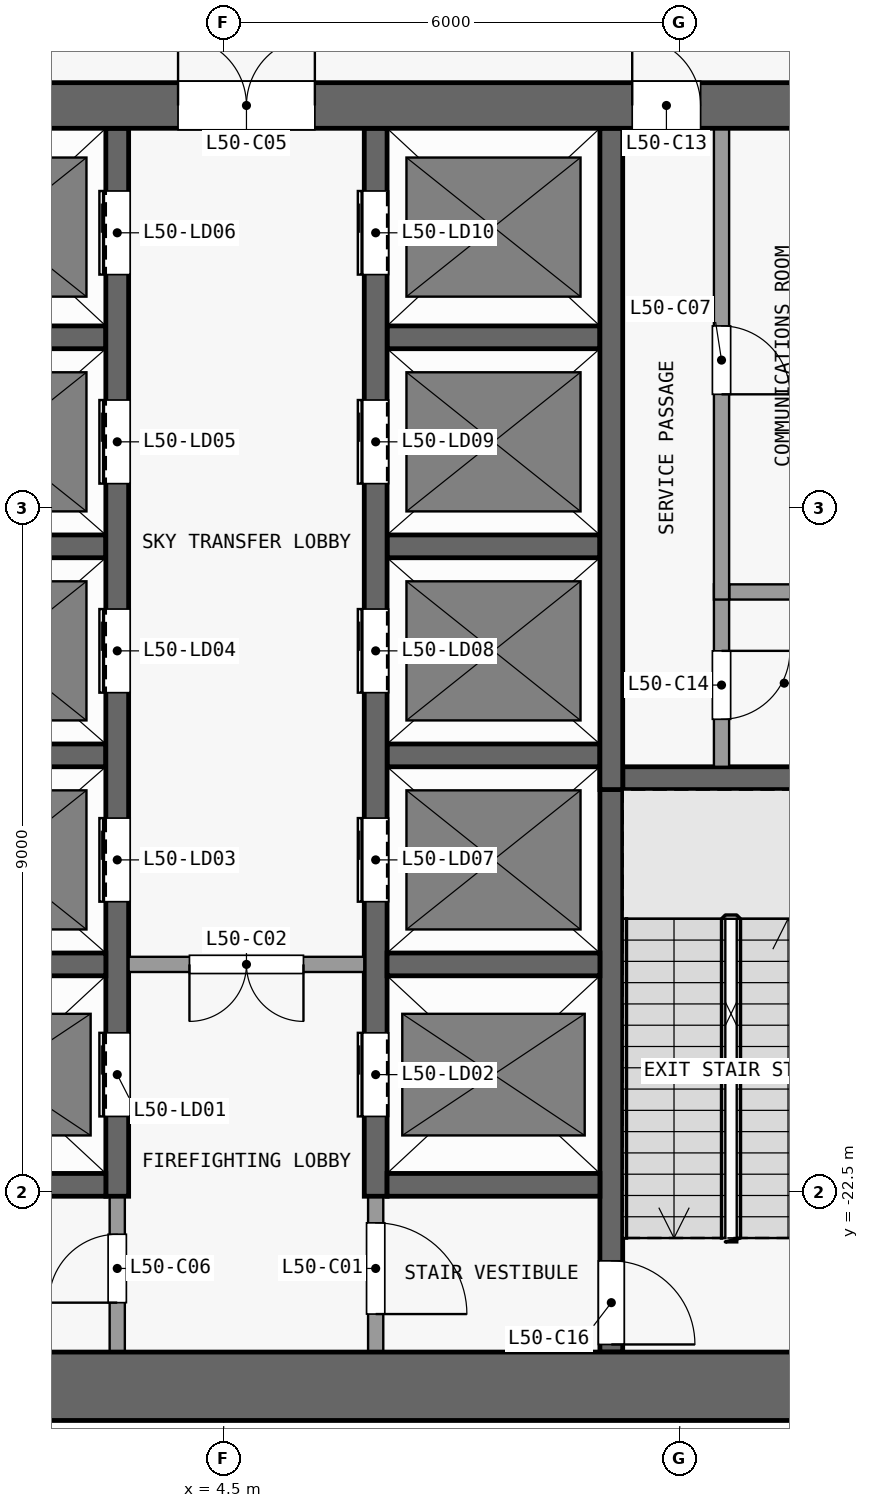
"""IFC4 building model, lengths in metres.
Left out: names, types, materials, properties, quantities, classifications, styles, units other than length and angle.
Written with IfcOpenShell. Run it as: python <this file> out.ifc"""

import sys

from ifc_helpers import new_model, si_unit, direction, frame, frame_2d, origin, place, context, subcontext, project, spatial, rectangle, extrude, element, fill, save


model = new_model("IFC4")
c1 = context("Model", 3, precision=1e-05, world=origin(), true_north=direction((0.0, 1.0)))
c2 = subcontext(c1, "Body", "Model", "MODEL_VIEW")
j1 = project(units=[si_unit("LENGTHUNIT", "METRE"), si_unit("PLANEANGLEUNIT", "RADIAN")], contexts=[c1])
p1 = place(None, origin())
s1 = spatial("IfcSite", under=j1, at=p1, CompositionType="ELEMENT")
p2 = place(p1, origin())
s2 = spatial("IfcBuilding", under=s1, at=p2, CompositionType="ELEMENT")
p3 = place(p2, frame((0.0, 0.0, 199.7)))
s3 = spatial("IfcBuildingStorey", under=s2, at=p3, CompositionType="ELEMENT", Elevation=199.7)
p4 = place(p3, frame((-13.5, -25.05, 0.0), z_axis=(0.0, 0.0, 1.0), x_axis=(1.0, 0.0, 0.0)))
e1 = element("IfcWall", 1, at=p4, inside=s3, PredefinedType="SHEAR", context=c2, shape_type="SweptSolid", body=[
    extrude(rectangle(XDim=27.0, YDim=0.9, at=frame_2d((13.5, 0.0))), origin(), (0.0, 0.0, 1.0), 5.0),
])
p5 = place(p3, frame((-13.5, -8.2, 0.0), z_axis=(0.0, 0.0, 1.0), x_axis=(1.0, 0.0, 0.0)))
e2 = element("IfcWall", 2, at=p5, inside=s3, PredefinedType="SHEAR", context=c2, shape_type="SweptSolid", body=[
    extrude(rectangle(XDim=27.0, YDim=0.6, at=frame_2d((13.5, 0.0))), origin(), (0.0, 0.0, 1.0), 5.0),
])
p6 = place(p5, frame((7.8, 0.0, 0.0)))
e3 = element("IfcOpeningElement", 3, at=p6, cuts=e2, PredefinedType="OPENING", context=c2, shape_type="SweptSolid", body=[
    extrude(rectangle(XDim=1.8, YDim=2.1, at=frame_2d((0.9, 1.05))), frame((0.0, 0.31, 0.0), z_axis=(0.0, -1.0, 0.0), x_axis=(1.0, 0.0, 0.0)), (0.0, 0.0, 1.0), 0.62),
])
p7 = place(p5, frame((17.4, 0.0, 0.0)))
e4 = element("IfcOpeningElement", 4, at=p7, cuts=e2, PredefinedType="OPENING", context=c2, shape_type="SweptSolid", body=[
    extrude(rectangle(XDim=1.8, YDim=2.1, at=frame_2d((0.9, 1.05))), frame((0.0, 0.31, 0.0), z_axis=(0.0, -1.0, 0.0), x_axis=(1.0, 0.0, 0.0)), (0.0, 0.0, 1.0), 0.62),
])
p8 = place(p5, frame((1.725, 0.0, 0.0)))
e5 = element("IfcOpeningElement", 5, at=p8, cuts=e2, PredefinedType="OPENING", context=c2, shape_type="SweptSolid", body=[
    extrude(rectangle(XDim=1.2, YDim=2.1, at=frame_2d((0.6, 1.05))), frame((0.0, 0.31, 0.0), z_axis=(0.0, -1.0, 0.0), x_axis=(1.0, 0.0, 0.0)), (0.0, 0.0, 1.0), 0.62),
])
p9 = place(p5, frame((23.375, 0.0, 0.0)))
e6 = element("IfcOpeningElement", 6, at=p9, cuts=e2, PredefinedType="OPENING", context=c2, shape_type="SweptSolid", body=[
    extrude(rectangle(XDim=0.9, YDim=2.1, at=frame_2d((0.45, 1.05))), frame((0.0, 0.31, 0.0), z_axis=(0.0, -1.0, 0.0), x_axis=(1.0, 0.0, 0.0)), (0.0, 0.0, 1.0), 0.62),
])
p10 = place(p3, frame((-3.25, -22.4, 0.0), z_axis=(0.0, 0.0, 1.0), x_axis=(1.0, 0.0, 0.0)))
e7 = element("IfcWall", 7, at=p10, inside=s3, PredefinedType="SHEAR", context=c2, shape_type="SweptSolid", body=[
    extrude(rectangle(XDim=6.2, YDim=0.3, at=frame_2d((3.1, 0.0))), origin(), (0.0, 0.0, 1.0), 5.0),
])
for number, where, z_axis, x_axis in (
    (8, (6.65, -22.4, 0.0), (0.0, 0.0, 1.0), (1.0, 0.0, 0.0)),
    (9, (0.15, -19.5, 0.0), (0.0, 0.0, 1.0), (1.0, 0.0, 0.0)),
):
    element("IfcWall", number, at=place(p3, frame(where, z_axis=z_axis, x_axis=x_axis)), inside=s3, PredefinedType="SHEAR", context=c2, shape_type="SweptSolid", body=[
        extrude(rectangle(XDim=2.8, YDim=0.3, at=frame_2d((1.4, 0.0))), origin(), (0.0, 0.0, 1.0), 5.0),
    ])
p11 = place(p3, frame((6.35, -19.5, 0.0), z_axis=(0.0, 0.0, 1.0), x_axis=(-1.0, 0.0, 0.0)))
e10 = element("IfcWall", 10, at=p11, inside=s3, PredefinedType="PARTITIONING", context=c2, shape_type="SweptSolid", body=[
    extrude(rectangle(XDim=3.1, YDim=0.2, at=frame_2d((1.55, 0.0))), origin(), (0.0, 0.0, 1.0), 5.0),
])
p12 = place(p11, frame((0.8, 0.0, 0.0)))
e11 = element("IfcOpeningElement", 11, at=p12, cuts=e10, PredefinedType="OPENING", context=c2, shape_type="SweptSolid", body=[
    extrude(rectangle(XDim=1.5, YDim=2.1, at=frame_2d((0.75, 1.05))), frame((0.0, 0.11, 0.0), z_axis=(0.0, -1.0, 0.0), x_axis=(1.0, 0.0, 0.0)), (0.0, 0.0, 1.0), 0.22),
])
p13 = place(p3, frame((6.65, -19.5, 0.0), z_axis=(0.0, 0.0, 1.0), x_axis=(1.0, 0.0, 0.0)))
e12 = element("IfcWall", 12, at=p13, inside=s3, PredefinedType="SHEAR", context=c2, shape_type="SweptSolid", body=[
    extrude(rectangle(XDim=2.8, YDim=0.3, at=frame_2d((1.4, 0.0))), origin(), (0.0, 0.0, 1.0), 5.0),
])
p14 = place(p3, frame((9.75, -17.05, 0.0), z_axis=(0.0, 0.0, 1.0), x_axis=(1.0, 0.0, 0.0)))
e13 = element("IfcWall", 13, at=p14, inside=s3, PredefinedType="SHEAR", context=c2, shape_type="SweptSolid", body=[
    extrude(rectangle(XDim=2.85, YDim=0.3, at=frame_2d((1.425, 0.0))), origin(), (0.0, 0.0, 1.0), 5.0),
])
for number, where, z_axis, x_axis in (
    (14, (0.15, -16.75, 0.0), (0.0, 0.0, 1.0), (1.0, 0.0, 0.0)),
    (15, (6.65, -16.75, 0.0), (0.0, 0.0, 1.0), (1.0, 0.0, 0.0)),
):
    element("IfcWall", number, at=place(p3, frame(where, z_axis=z_axis, x_axis=x_axis)), inside=s3, PredefinedType="SHEAR", context=c2, shape_type="SweptSolid", body=[
        extrude(rectangle(XDim=2.8, YDim=0.3, at=frame_2d((1.4, 0.0))), origin(), (0.0, 0.0, 1.0), 5.0),
    ])
p15 = place(p3, frame((11.15, -14.6, 0.0), z_axis=(0.0, 0.0, 1.0), x_axis=(1.0, 0.0, 0.0)))
e16 = element("IfcWall", 16, at=p15, inside=s3, PredefinedType="PARTITIONING", context=c2, shape_type="SweptSolid", body=[
    extrude(rectangle(XDim=1.45, YDim=0.2, at=frame_2d((0.725, 0.0))), origin(), (0.0, 0.0, 1.0), 5.0),
])
for number, where, z_axis, x_axis in (
    (17, (0.15, -14.0, 0.0), (0.0, 0.0, 1.0), (1.0, 0.0, 0.0)),
    (18, (6.65, -14.0, 0.0), (0.0, 0.0, 1.0), (1.0, 0.0, 0.0)),
    (19, (0.15, -11.25, 0.0), (0.0, 0.0, 1.0), (1.0, 0.0, 0.0)),
    (20, (6.65, -11.25, 0.0), (0.0, 0.0, 1.0), (1.0, 0.0, 0.0)),
):
    element("IfcWall", number, at=place(p3, frame(where, z_axis=z_axis, x_axis=x_axis)), inside=s3, PredefinedType="SHEAR", context=c2, shape_type="SweptSolid", body=[
        extrude(rectangle(XDim=2.8, YDim=0.3, at=frame_2d((1.4, 0.0))), origin(), (0.0, 0.0, 1.0), 5.0),
    ])
p16 = place(p3, frame((3.1, -24.6, 0.0), z_axis=(0.0, 0.0, 1.0), x_axis=(0.0, 1.0, 0.0)))
e21 = element("IfcWall", 21, at=p16, inside=s3, PredefinedType="PARTITIONING", context=c2, shape_type="SweptSolid", body=[
    extrude(rectangle(XDim=2.05, YDim=0.2, at=frame_2d((1.025, 0.0))), origin(), (0.0, 0.0, 1.0), 5.0),
])
p17 = place(p16, frame((0.65, 0.0, 0.0)))
e22 = element("IfcOpeningElement", 22, at=p17, cuts=e21, PredefinedType="OPENING", context=c2, shape_type="SweptSolid", body=[
    extrude(rectangle(XDim=0.9, YDim=2.1, at=frame_2d((0.45, 1.05))), frame((0.0, 0.11, 0.0), z_axis=(0.0, -1.0, 0.0), x_axis=(1.0, 0.0, 0.0)), (0.0, 0.0, 1.0), 0.22),
])
p18 = place(p3, frame((3.1, -22.55, 0.0), z_axis=(0.0, 0.0, 1.0), x_axis=(0.0, 1.0, 0.0)))
e23 = element("IfcWall", 23, at=p18, inside=s3, PredefinedType="SHEAR", context=c2, shape_type="SweptSolid", body=[
    extrude(rectangle(XDim=14.05, YDim=0.3, at=frame_2d((7.025, 0.0))), origin(), (0.0, 0.0, 1.0), 5.0),
])
p19 = place(p18, frame((1.05, 0.0, 0.0)))
e24 = element("IfcOpeningElement", 24, at=p19, cuts=e23, PredefinedType="OPENING", context=c2, shape_type="SweptSolid", body=[
    extrude(rectangle(XDim=1.1, YDim=2.1, at=frame_2d((0.55, 1.05))), frame((0.0, 0.16, 0.0), z_axis=(0.0, -1.0, 0.0), x_axis=(1.0, 0.0, 0.0)), (0.0, 0.0, 1.0), 0.32),
])
p20 = place(p18, frame((3.875, 0.0, 0.0)))
e25 = element("IfcOpeningElement", 25, at=p20, cuts=e23, PredefinedType="OPENING", context=c2, shape_type="SweptSolid", body=[
    extrude(rectangle(XDim=1.1, YDim=2.1, at=frame_2d((0.55, 1.05))), frame((0.0, 0.16, 0.0), z_axis=(0.0, -1.0, 0.0), x_axis=(1.0, 0.0, 0.0)), (0.0, 0.0, 1.0), 0.32),
])
p21 = place(p18, frame((6.625, 0.0, 0.0)))
e26 = element("IfcOpeningElement", 26, at=p21, cuts=e23, PredefinedType="OPENING", context=c2, shape_type="SweptSolid", body=[
    extrude(rectangle(XDim=1.1, YDim=2.1, at=frame_2d((0.55, 1.05))), frame((0.0, 0.16, 0.0), z_axis=(0.0, -1.0, 0.0), x_axis=(1.0, 0.0, 0.0)), (0.0, 0.0, 1.0), 0.32),
])
p22 = place(p18, frame((9.375, 0.0, 0.0)))
e27 = element("IfcOpeningElement", 27, at=p22, cuts=e23, PredefinedType="OPENING", context=c2, shape_type="SweptSolid", body=[
    extrude(rectangle(XDim=1.1, YDim=2.1, at=frame_2d((0.55, 1.05))), frame((0.0, 0.16, 0.0), z_axis=(0.0, -1.0, 0.0), x_axis=(1.0, 0.0, 0.0)), (0.0, 0.0, 1.0), 0.32),
])
p23 = place(p18, frame((12.125, 0.0, 0.0)))
e28 = element("IfcOpeningElement", 28, at=p23, cuts=e23, PredefinedType="OPENING", context=c2, shape_type="SweptSolid", body=[
    extrude(rectangle(XDim=1.1, YDim=2.1, at=frame_2d((0.55, 1.05))), frame((0.0, 0.16, 0.0), z_axis=(0.0, -1.0, 0.0), x_axis=(1.0, 0.0, 0.0)), (0.0, 0.0, 1.0), 0.32),
])
p24 = place(p3, frame((6.5, -22.55, 0.0), z_axis=(0.0, 0.0, 1.0), x_axis=(0.0, -1.0, 0.0)))
e29 = element("IfcWall", 29, at=p24, inside=s3, PredefinedType="PARTITIONING", context=c2, shape_type="SweptSolid", body=[
    extrude(rectangle(XDim=2.05, YDim=0.2, at=frame_2d((1.025, 0.0))), origin(), (0.0, 0.0, 1.0), 5.0),
])
p25 = place(p24, frame((0.35, 0.0, 0.0)))
e30 = element("IfcOpeningElement", 30, at=p25, cuts=e29, PredefinedType="OPENING", context=c2, shape_type="SweptSolid", body=[
    extrude(rectangle(XDim=1.2, YDim=2.1, at=frame_2d((0.6, 1.05))), frame((0.0, 0.11, 0.0), z_axis=(0.0, -1.0, 0.0), x_axis=(1.0, 0.0, 0.0)), (0.0, 0.0, 1.0), 0.22),
])
p26 = place(p3, frame((6.5, -22.55, 0.0), z_axis=(0.0, 0.0, 1.0), x_axis=(0.0, 1.0, 0.0)))
e31 = element("IfcWall", 31, at=p26, inside=s3, PredefinedType="SHEAR", context=c2, shape_type="SweptSolid", body=[
    extrude(rectangle(XDim=14.05, YDim=0.3, at=frame_2d((7.025, 0.0))), origin(), (0.0, 0.0, 1.0), 5.0),
])
p27 = place(p26, frame((1.05, 0.0, 0.0)))
e32 = element("IfcOpeningElement", 32, at=p27, cuts=e31, PredefinedType="OPENING", context=c2, shape_type="SweptSolid", body=[
    extrude(rectangle(XDim=1.1, YDim=2.1, at=frame_2d((0.55, 1.05))), frame((0.0, 0.16, 0.0), z_axis=(0.0, -1.0, 0.0), x_axis=(1.0, 0.0, 0.0)), (0.0, 0.0, 1.0), 0.32),
])
p28 = place(p26, frame((3.875, 0.0, 0.0)))
e33 = element("IfcOpeningElement", 33, at=p28, cuts=e31, PredefinedType="OPENING", context=c2, shape_type="SweptSolid", body=[
    extrude(rectangle(XDim=1.1, YDim=2.1, at=frame_2d((0.55, 1.05))), frame((0.0, 0.16, 0.0), z_axis=(0.0, -1.0, 0.0), x_axis=(1.0, 0.0, 0.0)), (0.0, 0.0, 1.0), 0.32),
])
p29 = place(p26, frame((6.625, 0.0, 0.0)))
e34 = element("IfcOpeningElement", 34, at=p29, cuts=e31, PredefinedType="OPENING", context=c2, shape_type="SweptSolid", body=[
    extrude(rectangle(XDim=1.1, YDim=2.1, at=frame_2d((0.55, 1.05))), frame((0.0, 0.16, 0.0), z_axis=(0.0, -1.0, 0.0), x_axis=(1.0, 0.0, 0.0)), (0.0, 0.0, 1.0), 0.32),
])
p30 = place(p26, frame((9.375, 0.0, 0.0)))
e35 = element("IfcOpeningElement", 35, at=p30, cuts=e31, PredefinedType="OPENING", context=c2, shape_type="SweptSolid", body=[
    extrude(rectangle(XDim=1.1, YDim=2.1, at=frame_2d((0.55, 1.05))), frame((0.0, 0.16, 0.0), z_axis=(0.0, -1.0, 0.0), x_axis=(1.0, 0.0, 0.0)), (0.0, 0.0, 1.0), 0.32),
])
p31 = place(p26, frame((12.125, 0.0, 0.0)))
e36 = element("IfcOpeningElement", 36, at=p31, cuts=e31, PredefinedType="OPENING", context=c2, shape_type="SweptSolid", body=[
    extrude(rectangle(XDim=1.1, YDim=2.1, at=frame_2d((0.55, 1.05))), frame((0.0, 0.16, 0.0), z_axis=(0.0, -1.0, 0.0), x_axis=(1.0, 0.0, 0.0)), (0.0, 0.0, 1.0), 0.32),
])
p32 = place(p3, frame((9.6, -16.9, 0.0), z_axis=(0.0, 0.0, 1.0), x_axis=(0.0, -1.0, 0.0)))
e37 = element("IfcWall", 37, at=p32, inside=s3, PredefinedType="SHEAR", context=c2, shape_type="SweptSolid", body=[
    extrude(rectangle(XDim=7.7, YDim=0.3, at=frame_2d((3.85, 0.0))), origin(), (0.0, 0.0, 1.0), 5.0),
])
p33 = place(p32, frame((6.5, 0.0, 0.0)))
e38 = element("IfcOpeningElement", 38, at=p33, cuts=e37, PredefinedType="OPENING", context=c2, shape_type="SweptSolid", body=[
    extrude(rectangle(XDim=1.1, YDim=2.1, at=frame_2d((0.55, 1.05))), frame((0.0, 0.16, 0.0), z_axis=(0.0, -1.0, 0.0), x_axis=(1.0, 0.0, 0.0)), (0.0, 0.0, 1.0), 0.32),
])
p34 = place(p3, frame((9.6, -17.2, 0.0), z_axis=(0.0, 0.0, 1.0), x_axis=(0.0, 1.0, 0.0)))
e39 = element("IfcWall", 39, at=p34, inside=s3, PredefinedType="SHEAR", context=c2, shape_type="SweptSolid", body=[
    extrude(rectangle(XDim=8.7, YDim=0.3, at=frame_2d((4.35, 0.0))), origin(), (0.0, 0.0, 1.0), 5.0),
])
p35 = place(p3, frame((11.05, -14.5, 0.0), z_axis=(0.0, 0.0, 1.0), x_axis=(0.0, -1.0, 0.0)))
e40 = element("IfcWall", 40, at=p35, inside=s3, PredefinedType="PARTITIONING", context=c2, shape_type="SweptSolid", body=[
    extrude(rectangle(XDim=2.4, YDim=0.2, at=frame_2d((1.2, 0.0))), origin(), (0.0, 0.0, 1.0), 5.0),
])
p36 = place(p35, frame((0.875, 0.0, 0.0)))
e41 = element("IfcOpeningElement", 41, at=p36, cuts=e40, PredefinedType="OPENING", context=c2, shape_type="SweptSolid", body=[
    extrude(rectangle(XDim=0.9, YDim=2.1, at=frame_2d((0.45, 1.05))), frame((0.0, 0.11, 0.0), z_axis=(0.0, -1.0, 0.0), x_axis=(1.0, 0.0, 0.0)), (0.0, 0.0, 1.0), 0.22),
])
p37 = place(p3, frame((11.05, -8.5, 0.0), z_axis=(0.0, 0.0, 1.0), x_axis=(0.0, -1.0, 0.0)))
e42 = element("IfcWall", 42, at=p37, inside=s3, PredefinedType="PARTITIONING", context=c2, shape_type="SweptSolid", body=[
    extrude(rectangle(XDim=6.2, YDim=0.2, at=frame_2d((3.1, 0.0))), origin(), (0.0, 0.0, 1.0), 5.0),
])
p38 = place(p37, frame((2.6, 0.0, 0.0)))
e43 = element("IfcOpeningElement", 43, at=p38, cuts=e42, PredefinedType="OPENING", context=c2, shape_type="SweptSolid", body=[
    extrude(rectangle(XDim=0.9, YDim=2.1, at=frame_2d((0.45, 1.05))), frame((0.0, 0.11, 0.0), z_axis=(0.0, -1.0, 0.0), x_axis=(1.0, 0.0, 0.0)), (0.0, 0.0, 1.0), 0.22),
])
p39 = place(p19, origin())
e44 = element("IfcDoor", 44, at=p39, inside=s3, OperationType="DOUBLE_DOOR_SLIDING", PredefinedType="DOOR", context=c2, shape_type="SweptSolid", body=[
    extrude(rectangle(XDim=1.1, YDim=2.1, at=frame_2d((0.55, 1.05))), frame((0.0, 0.025, 0.0), z_axis=(0.0, -1.0, 0.0), x_axis=(1.0, 0.0, 0.0)), (0.0, 0.0, 1.0), 0.05),
])
fill(e24, e44)
p40 = place(p27, origin())
e45 = element("IfcDoor", 45, at=p40, inside=s3, OperationType="DOUBLE_DOOR_SLIDING", PredefinedType="DOOR", context=c2, shape_type="SweptSolid", body=[
    extrude(rectangle(XDim=1.1, YDim=2.1, at=frame_2d((0.55, 1.05))), frame((0.0, 0.025, 0.0), z_axis=(0.0, -1.0, 0.0), x_axis=(1.0, 0.0, 0.0)), (0.0, 0.0, 1.0), 0.05),
])
fill(e32, e45)
p41 = place(p20, origin())
e46 = element("IfcDoor", 46, at=p41, inside=s3, OperationType="DOUBLE_DOOR_SLIDING", PredefinedType="DOOR", context=c2, shape_type="SweptSolid", body=[
    extrude(rectangle(XDim=1.1, YDim=2.1, at=frame_2d((0.55, 1.05))), frame((0.0, 0.025, 0.0), z_axis=(0.0, -1.0, 0.0), x_axis=(1.0, 0.0, 0.0)), (0.0, 0.0, 1.0), 0.05),
])
fill(e25, e46)
p42 = place(p21, origin())
e47 = element("IfcDoor", 47, at=p42, inside=s3, OperationType="DOUBLE_DOOR_SLIDING", PredefinedType="DOOR", context=c2, shape_type="SweptSolid", body=[
    extrude(rectangle(XDim=1.1, YDim=2.1, at=frame_2d((0.55, 1.05))), frame((0.0, 0.025, 0.0), z_axis=(0.0, -1.0, 0.0), x_axis=(1.0, 0.0, 0.0)), (0.0, 0.0, 1.0), 0.05),
])
fill(e26, e47)
p43 = place(p22, origin())
e48 = element("IfcDoor", 48, at=p43, inside=s3, OperationType="DOUBLE_DOOR_SLIDING", PredefinedType="DOOR", context=c2, shape_type="SweptSolid", body=[
    extrude(rectangle(XDim=1.1, YDim=2.1, at=frame_2d((0.55, 1.05))), frame((0.0, 0.025, 0.0), z_axis=(0.0, -1.0, 0.0), x_axis=(1.0, 0.0, 0.0)), (0.0, 0.0, 1.0), 0.05),
])
fill(e27, e48)
p44 = place(p23, origin())
e49 = element("IfcDoor", 49, at=p44, inside=s3, OperationType="DOUBLE_DOOR_SLIDING", PredefinedType="DOOR", context=c2, shape_type="SweptSolid", body=[
    extrude(rectangle(XDim=1.1, YDim=2.1, at=frame_2d((0.55, 1.05))), frame((0.0, 0.025, 0.0), z_axis=(0.0, -1.0, 0.0), x_axis=(1.0, 0.0, 0.0)), (0.0, 0.0, 1.0), 0.05),
])
fill(e28, e49)
p45 = place(p28, origin())
e50 = element("IfcDoor", 50, at=p45, inside=s3, OperationType="DOUBLE_DOOR_SLIDING", PredefinedType="DOOR", context=c2, shape_type="SweptSolid", body=[
    extrude(rectangle(XDim=1.1, YDim=2.1, at=frame_2d((0.55, 1.05))), frame((0.0, 0.025, 0.0), z_axis=(0.0, -1.0, 0.0), x_axis=(1.0, 0.0, 0.0)), (0.0, 0.0, 1.0), 0.05),
])
fill(e33, e50)
p46 = place(p29, origin())
e51 = element("IfcDoor", 51, at=p46, inside=s3, OperationType="DOUBLE_DOOR_SLIDING", PredefinedType="DOOR", context=c2, shape_type="SweptSolid", body=[
    extrude(rectangle(XDim=1.1, YDim=2.1, at=frame_2d((0.55, 1.05))), frame((0.0, 0.025, 0.0), z_axis=(0.0, -1.0, 0.0), x_axis=(1.0, 0.0, 0.0)), (0.0, 0.0, 1.0), 0.05),
])
fill(e34, e51)
p47 = place(p30, origin())
e52 = element("IfcDoor", 52, at=p47, inside=s3, OperationType="DOUBLE_DOOR_SLIDING", PredefinedType="DOOR", context=c2, shape_type="SweptSolid", body=[
    extrude(rectangle(XDim=1.1, YDim=2.1, at=frame_2d((0.55, 1.05))), frame((0.0, 0.025, 0.0), z_axis=(0.0, -1.0, 0.0), x_axis=(1.0, 0.0, 0.0)), (0.0, 0.0, 1.0), 0.05),
])
fill(e35, e52)
p48 = place(p31, origin())
e53 = element("IfcDoor", 53, at=p48, inside=s3, OperationType="DOUBLE_DOOR_SLIDING", PredefinedType="DOOR", context=c2, shape_type="SweptSolid", body=[
    extrude(rectangle(XDim=1.1, YDim=2.1, at=frame_2d((0.55, 1.05))), frame((0.0, 0.025, 0.0), z_axis=(0.0, -1.0, 0.0), x_axis=(1.0, 0.0, 0.0)), (0.0, 0.0, 1.0), 0.05),
])
fill(e36, e53)
p49 = place(p25, origin())
e54 = element("IfcDoor", 54, at=p49, inside=s3, OperationType="SINGLE_SWING_RIGHT", PredefinedType="DOOR", context=c2, shape_type="SweptSolid", body=[
    extrude(rectangle(XDim=1.2, YDim=2.1, at=frame_2d((0.6, 1.05))), frame((0.0, 0.025, 0.0), z_axis=(0.0, -1.0, 0.0), x_axis=(1.0, 0.0, 0.0)), (0.0, 0.0, 1.0), 0.05),
])
fill(e30, e54)
p50 = place(p12, origin())
e55 = element("IfcDoor", 55, at=p50, inside=s3, OperationType="DOUBLE_DOOR_SINGLE_SWING", PredefinedType="DOOR", context=c2, shape_type="SweptSolid", body=[
    extrude(rectangle(XDim=1.5, YDim=2.1, at=frame_2d((0.75, 1.05))), frame((0.0, 0.025, 0.0), z_axis=(0.0, -1.0, 0.0), x_axis=(1.0, 0.0, 0.0)), (0.0, 0.0, 1.0), 0.05),
])
fill(e11, e55)
p51 = place(p7, origin())
e56 = element("IfcDoor", 56, at=p51, inside=s3, OperationType="DOUBLE_DOOR_SINGLE_SWING", PredefinedType="DOOR", context=c2, shape_type="SweptSolid", body=[
    extrude(rectangle(XDim=1.8, YDim=2.1, at=frame_2d((0.9, 1.05))), frame((0.0, 0.025, 0.0), z_axis=(0.0, -1.0, 0.0), x_axis=(1.0, 0.0, 0.0)), (0.0, 0.0, 1.0), 0.05),
])
fill(e4, e56)
p52 = place(p17, origin())
e57 = element("IfcDoor", 57, at=p52, inside=s3, OperationType="SINGLE_SWING_LEFT", PredefinedType="DOOR", context=c2, shape_type="SweptSolid", body=[
    extrude(rectangle(XDim=0.9, YDim=2.1, at=frame_2d((0.45, 1.05))), frame((0.0, 0.025, 0.0), z_axis=(0.0, -1.0, 0.0), x_axis=(1.0, 0.0, 0.0)), (0.0, 0.0, 1.0), 0.05),
])
fill(e22, e57)
p53 = place(p38, origin())
e58 = element("IfcDoor", 58, at=p53, inside=s3, OperationType="SINGLE_SWING_RIGHT", PredefinedType="DOOR", context=c2, shape_type="SweptSolid", body=[
    extrude(rectangle(XDim=0.9, YDim=2.1, at=frame_2d((0.45, 1.05))), frame((0.0, 0.025, 0.0), z_axis=(0.0, -1.0, 0.0), x_axis=(1.0, 0.0, 0.0)), (0.0, 0.0, 1.0), 0.05),
])
fill(e43, e58)
p54 = place(p9, origin())
e59 = element("IfcDoor", 59, at=p54, inside=s3, OperationType="SINGLE_SWING_LEFT", PredefinedType="DOOR", context=c2, shape_type="SweptSolid", body=[
    extrude(rectangle(XDim=0.9, YDim=2.1, at=frame_2d((0.45, 1.05))), frame((0.0, 0.025, 0.0), z_axis=(0.0, -1.0, 0.0), x_axis=(1.0, 0.0, 0.0)), (0.0, 0.0, 1.0), 0.05),
])
fill(e6, e59)
p55 = place(p36, origin())
e60 = element("IfcDoor", 60, at=p55, inside=s3, OperationType="SINGLE_SWING_LEFT", PredefinedType="DOOR", context=c2, shape_type="SweptSolid", body=[
    extrude(rectangle(XDim=0.9, YDim=2.1, at=frame_2d((0.45, 1.05))), frame((0.0, 0.025, 0.0), z_axis=(0.0, -1.0, 0.0), x_axis=(1.0, 0.0, 0.0)), (0.0, 0.0, 1.0), 0.05),
])
fill(e41, e60)
p56 = place(p33, origin())
e61 = element("IfcDoor", 61, at=p56, inside=s3, OperationType="SINGLE_SWING_RIGHT", PredefinedType="DOOR", context=c2, shape_type="SweptSolid", body=[
    extrude(rectangle(XDim=1.1, YDim=2.1, at=frame_2d((0.55, 1.05))), frame((0.0, 0.025, 0.0), z_axis=(0.0, -1.0, 0.0), x_axis=(1.0, 0.0, 0.0)), (0.0, 0.0, 1.0), 0.05),
])
fill(e38, e61)
save(model, sys.argv[1])
